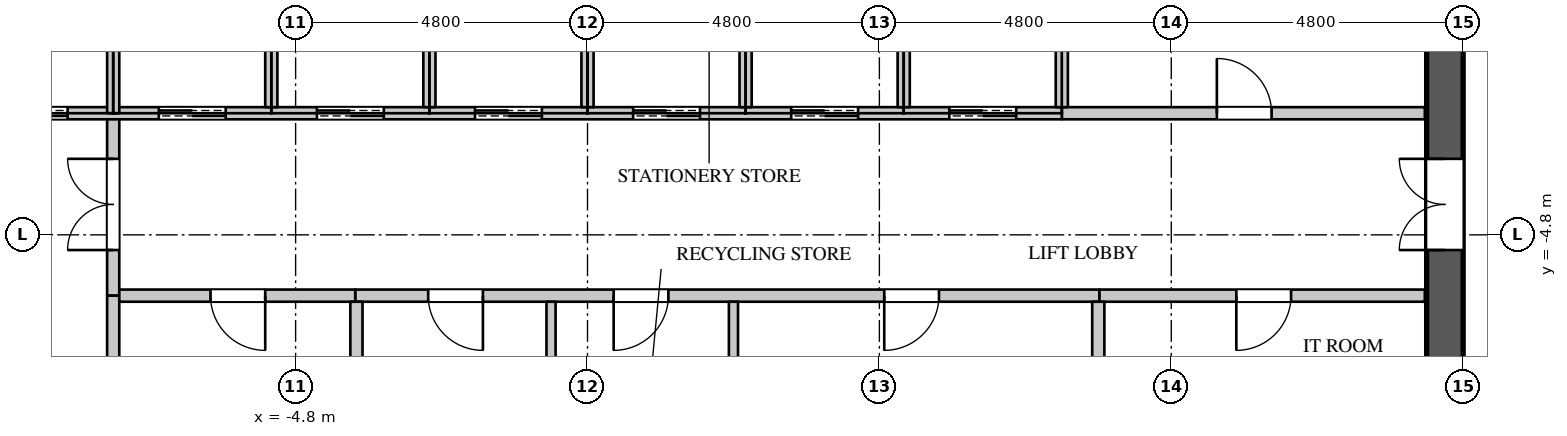
"""IFC4 building model, lengths in metres.
Left out: names, types, materials, properties, quantities, classifications, styles, units other than length and angle.
Written with IfcOpenShell. Run it as: python <this file> out.ifc"""

import sys

from ifc_helpers import new_model, si_unit, direction, frame, frame_2d, origin, place, context, subcontext, project, spatial, rectangle, extrude, element, fill, save


model = new_model("IFC4")
c1 = context("Model", 3, precision=1e-05, world=origin(), true_north=direction((0.0, 1.0)))
c2 = subcontext(c1, "Body", "Model", "MODEL_VIEW")
j1 = project(units=[si_unit("LENGTHUNIT", "METRE"), si_unit("PLANEANGLEUNIT", "RADIAN")], contexts=[c1])
p1 = place(None, origin())
s1 = spatial("IfcSite", under=j1, at=p1, CompositionType="ELEMENT")
p2 = place(p1, origin())
s2 = spatial("IfcBuilding", under=s1, at=p2, CompositionType="ELEMENT")
p3 = place(p2, frame((0.0, 0.0, 306.3)))
s3 = spatial("IfcBuildingStorey", under=s2, at=p3, CompositionType="ELEMENT", Elevation=306.3)
p4 = place(p3, frame((14.1, -11.4, 0.0), z_axis=(0.0, 0.0, 1.0), x_axis=(0.0, 1.0, 0.0)))
e1 = element("IfcWall", 1, at=p4, inside=s3, PredefinedType="SHEAR", context=c2, shape_type="SweptSolid", body=[
    extrude(rectangle(XDim=22.8, YDim=0.6, at=frame_2d((11.4, 0.0))), origin(), (0.0, 0.0, 1.0), 4.2),
])
p5 = place(p4, frame((20.45, 0.0, 0.0)))
e2 = element("IfcOpeningElement", 2, at=p5, cuts=e1, PredefinedType="OPENING", context=c2, shape_type="SweptSolid", body=[
    extrude(rectangle(XDim=1.1, YDim=2.2, at=frame_2d((0.55, 1.1))), frame((0.0, 0.31, 0.0), z_axis=(0.0, -1.0, 0.0), x_axis=(1.0, 0.0, 0.0)), (0.0, 0.0, 1.0), 0.62),
])
p6 = place(p4, frame((1.25, 0.0, 0.0)))
e3 = element("IfcOpeningElement", 3, at=p6, cuts=e1, PredefinedType="OPENING", context=c2, shape_type="SweptSolid", body=[
    extrude(rectangle(XDim=1.1, YDim=2.2, at=frame_2d((0.55, 1.1))), frame((0.0, 0.31, 0.0), z_axis=(0.0, -1.0, 0.0), x_axis=(1.0, 0.0, 0.0)), (0.0, 0.0, 1.0), 0.62),
])
p7 = place(p4, frame((14.95, 0.0, 0.0)))
e4 = element("IfcOpeningElement", 4, at=p7, cuts=e1, PredefinedType="OPENING", context=c2, shape_type="SweptSolid", body=[
    extrude(rectangle(XDim=1.5, YDim=2.4, at=frame_2d((0.75, 1.2))), frame((0.0, 0.31, 0.0), z_axis=(0.0, -1.0, 0.0), x_axis=(1.0, 0.0, 0.0)), (0.0, 0.0, 1.0), 0.62),
])
p8 = place(p4, frame((6.35, 0.0, 0.0)))
e5 = element("IfcOpeningElement", 5, at=p8, cuts=e1, PredefinedType="OPENING", context=c2, shape_type="SweptSolid", body=[
    extrude(rectangle(XDim=1.5, YDim=2.4, at=frame_2d((0.75, 1.2))), frame((0.0, 0.31, 0.0), z_axis=(0.0, -1.0, 0.0), x_axis=(1.0, 0.0, 0.0)), (0.0, 0.0, 1.0), 0.62),
])
p9 = place(p3, frame((-7.8, -5.8, 0.0), z_axis=(0.0, 0.0, 1.0), x_axis=(0.0, 1.0, 0.0)))
e6 = element("IfcWall", 6, at=p9, inside=s3, PredefinedType="PARTITIONING", context=c2, shape_type="SweptSolid", body=[
    extrude(rectangle(XDim=3.0, YDim=0.2, at=frame_2d((1.5, 0.0))), origin(), (0.0, 0.0, 1.0), 3.9),
])
p10 = place(p9, frame((0.75, 0.0, 0.0)))
e7 = element("IfcOpeningElement", 7, at=p10, cuts=e6, PredefinedType="OPENING", context=c2, shape_type="SweptSolid", body=[
    extrude(rectangle(XDim=1.5, YDim=2.4, at=frame_2d((0.75, 1.2))), frame((0.0, 0.11, 0.0), z_axis=(0.0, -1.0, 0.0), x_axis=(1.0, 0.0, 0.0)), (0.0, 0.0, 1.0), 0.22),
])
p11 = place(p3, frame((-3.82, -5.8, 0.0), z_axis=(0.0, 0.0, 1.0), x_axis=(1.0, 0.0, 0.0)))
e8 = element("IfcWall", 8, at=p11, inside=s3, PredefinedType="PARTITIONING", context=c2, shape_type="SweptSolid", body=[
    extrude(rectangle(XDim=12.24, YDim=0.2, at=frame_2d((6.12, 0.0))), origin(), (0.0, 0.0, 1.0), 3.9),
])
p12 = place(p11, frame((1.2, 0.0, 0.0)))
e9 = element("IfcOpeningElement", 9, at=p12, cuts=e8, PredefinedType="OPENING", context=c2, shape_type="SweptSolid", body=[
    extrude(rectangle(XDim=0.9, YDim=2.2, at=frame_2d((0.45, 1.1))), frame((0.0, 0.11, 0.0), z_axis=(0.0, -1.0, 0.0), x_axis=(1.0, 0.0, 0.0)), (0.0, 0.0, 1.0), 0.22),
])
p13 = place(p11, frame((4.25, 0.0, 0.0)))
e10 = element("IfcOpeningElement", 10, at=p13, cuts=e8, PredefinedType="OPENING", context=c2, shape_type="SweptSolid", body=[
    extrude(rectangle(XDim=0.9, YDim=2.2, at=frame_2d((0.45, 1.1))), frame((0.0, 0.11, 0.0), z_axis=(0.0, -1.0, 0.0), x_axis=(1.0, 0.0, 0.0)), (0.0, 0.0, 1.0), 0.22),
])
p14 = place(p11, frame((8.7, 0.0, 0.0)))
e11 = element("IfcOpeningElement", 11, at=p14, cuts=e8, PredefinedType="OPENING", context=c2, shape_type="SweptSolid", body=[
    extrude(rectangle(XDim=0.9, YDim=2.2, at=frame_2d((0.45, 1.1))), frame((0.0, 0.11, 0.0), z_axis=(0.0, -1.0, 0.0), x_axis=(1.0, 0.0, 0.0)), (0.0, 0.0, 1.0), 0.22),
])
for number, where, z_axis, x_axis in (
    (12, (-0.6, -11.37, 0.0), (0.0, 0.0, 1.0), (0.0, 1.0, 0.0)),
    (13, (2.4, -11.37, 0.0), (0.0, 0.0, 1.0), (0.0, 1.0, 0.0)),
):
    element("IfcWall", number, at=place(p3, frame(where, z_axis=z_axis, x_axis=x_axis)), inside=s3, PredefinedType="PARTITIONING", context=c2, shape_type="SweptSolid", body=[
        extrude(rectangle(XDim=5.47, YDim=0.15, at=frame_2d((2.735, 0.0))), origin(), (0.0, 0.0, 1.0), 3.9),
    ])
p15 = place(p3, frame((-7.8, -8.075, 0.0), z_axis=(0.0, 0.0, 1.0), x_axis=(0.0, 1.0, 0.0)))
e14 = element("IfcWall", 14, at=p15, inside=s3, PredefinedType="PARTITIONING", context=c2, shape_type="SweptSolid", body=[
    extrude(rectangle(XDim=2.275, YDim=0.2, at=frame_2d((1.137, 0.0))), origin(), (0.0, 0.0, 1.0), 3.9),
])
p16 = place(p3, frame((-7.7, -5.8, 0.0), z_axis=(0.0, 0.0, 1.0), x_axis=(1.0, 0.0, 0.0)))
e15 = element("IfcWall", 15, at=p16, inside=s3, PredefinedType="PARTITIONING", context=c2, shape_type="SweptSolid", body=[
    extrude(rectangle(XDim=3.88, YDim=0.2, at=frame_2d((1.94, 0.0))), origin(), (0.0, 0.0, 1.0), 3.9),
])
p17 = place(p16, frame((1.5, 0.0, 0.0)))
e16 = element("IfcOpeningElement", 16, at=p17, cuts=e15, PredefinedType="OPENING", context=c2, shape_type="SweptSolid", body=[
    extrude(rectangle(XDim=0.9, YDim=2.2, at=frame_2d((0.45, 1.1))), frame((0.0, 0.11, 0.0), z_axis=(0.0, -1.0, 0.0), x_axis=(1.0, 0.0, 0.0)), (0.0, 0.0, 1.0), 0.22),
])
p18 = place(p3, frame((-3.8, -11.37, 0.0), z_axis=(0.0, 0.0, 1.0), x_axis=(0.0, 1.0, 0.0)))
e17 = element("IfcWall", 17, at=p18, inside=s3, PredefinedType="PARTITIONING", context=c2, shape_type="SweptSolid", body=[
    extrude(rectangle(XDim=5.47, YDim=0.2, at=frame_2d((2.735, 0.0))), origin(), (0.0, 0.0, 1.0), 3.9),
])
p19 = place(p3, frame((7.8, -2.8, 0.0), z_axis=(0.0, 0.0, 1.0), x_axis=(1.0, 0.0, 0.0)))
e18 = element("IfcWall", 18, at=p19, inside=s3, PredefinedType="PARTITIONING", context=c2, shape_type="SweptSolid", body=[
    extrude(rectangle(XDim=5.97, YDim=0.2, at=frame_2d((2.985, 0.0))), origin(), (0.0, 0.0, 1.0), 3.9),
])
p20 = place(p19, frame((2.55, 0.0, 0.0)))
e19 = element("IfcOpeningElement", 19, at=p20, cuts=e18, PredefinedType="OPENING", context=c2, shape_type="SweptSolid", body=[
    extrude(rectangle(XDim=0.9, YDim=2.2, at=frame_2d((0.45, 1.1))), frame((0.0, 0.11, 0.0), z_axis=(0.0, -1.0, 0.0), x_axis=(1.0, 0.0, 0.0)), (0.0, 0.0, 1.0), 0.22),
])
p21 = place(p3, frame((8.42, -5.8, 0.0), z_axis=(0.0, 0.0, 1.0), x_axis=(1.0, 0.0, 0.0)))
e20 = element("IfcWall", 20, at=p21, inside=s3, PredefinedType="PARTITIONING", context=c2, shape_type="SweptSolid", body=[
    extrude(rectangle(XDim=5.35, YDim=0.2, at=frame_2d((2.675, 0.0))), origin(), (0.0, 0.0, 1.0), 3.9),
])
p22 = place(p21, frame((2.25, 0.0, 0.0)))
e21 = element("IfcOpeningElement", 21, at=p22, cuts=e20, PredefinedType="OPENING", context=c2, shape_type="SweptSolid", body=[
    extrude(rectangle(XDim=0.9, YDim=2.2, at=frame_2d((0.45, 1.1))), frame((0.0, 0.11, 0.0), z_axis=(0.0, -1.0, 0.0), x_axis=(1.0, 0.0, 0.0)), (0.0, 0.0, 1.0), 0.22),
])
p23 = place(p3, frame((8.4, -8.075, 0.0), z_axis=(0.0, 0.0, 1.0), x_axis=(0.0, 1.0, 0.0)))
e22 = element("IfcWall", 22, at=p23, inside=s3, PredefinedType="PARTITIONING", context=c2, shape_type="SweptSolid", body=[
    extrude(rectangle(XDim=2.175, YDim=0.2, at=frame_2d((1.087, 0.0))), origin(), (0.0, 0.0, 1.0), 3.9),
])
p24 = place(p3, frame((-10.4, -2.8, 0.0), z_axis=(0.0, 0.0, 1.0), x_axis=(1.0, 0.0, 0.0)))
e23 = element("IfcWall", 23, at=p24, inside=s3, PredefinedType="PARTITIONING", context=c2, shape_type="SweptSolid", body=[
    extrude(rectangle(XDim=18.2, YDim=0.2, at=frame_2d((9.1, 0.0))), origin(), (0.0, 0.0, 1.0), 3.9),
])
p25 = place(p24, frame((0.75, 0.0, 0.0)))
e24 = element("IfcOpeningElement", 24, at=p25, cuts=e23, PredefinedType="OPENING", context=c2, shape_type="SweptSolid", body=[
    extrude(rectangle(XDim=1.1, YDim=2.2, at=frame_2d((0.55, 1.1))), frame((0.0, 0.11, 0.0), z_axis=(0.0, -1.0, 0.0), x_axis=(1.0, 0.0, 0.0)), (0.0, 0.0, 1.0), 0.22),
])
p26 = place(p24, frame((3.35, 0.0, 0.0)))
e25 = element("IfcOpeningElement", 25, at=p26, cuts=e23, PredefinedType="OPENING", context=c2, shape_type="SweptSolid", body=[
    extrude(rectangle(XDim=1.1, YDim=2.2, at=frame_2d((0.55, 1.1))), frame((0.0, 0.11, 0.0), z_axis=(0.0, -1.0, 0.0), x_axis=(1.0, 0.0, 0.0)), (0.0, 0.0, 1.0), 0.22),
])
p27 = place(p24, frame((5.95, 0.0, 0.0)))
e26 = element("IfcOpeningElement", 26, at=p27, cuts=e23, PredefinedType="OPENING", context=c2, shape_type="SweptSolid", body=[
    extrude(rectangle(XDim=1.1, YDim=2.2, at=frame_2d((0.55, 1.1))), frame((0.0, 0.11, 0.0), z_axis=(0.0, -1.0, 0.0), x_axis=(1.0, 0.0, 0.0)), (0.0, 0.0, 1.0), 0.22),
])
p28 = place(p24, frame((8.55, 0.0, 0.0)))
e27 = element("IfcOpeningElement", 27, at=p28, cuts=e23, PredefinedType="OPENING", context=c2, shape_type="SweptSolid", body=[
    extrude(rectangle(XDim=1.1, YDim=2.2, at=frame_2d((0.55, 1.1))), frame((0.0, 0.11, 0.0), z_axis=(0.0, -1.0, 0.0), x_axis=(1.0, 0.0, 0.0)), (0.0, 0.0, 1.0), 0.22),
])
p29 = place(p24, frame((11.15, 0.0, 0.0)))
e28 = element("IfcOpeningElement", 28, at=p29, cuts=e23, PredefinedType="OPENING", context=c2, shape_type="SweptSolid", body=[
    extrude(rectangle(XDim=1.1, YDim=2.2, at=frame_2d((0.55, 1.1))), frame((0.0, 0.11, 0.0), z_axis=(0.0, -1.0, 0.0), x_axis=(1.0, 0.0, 0.0)), (0.0, 0.0, 1.0), 0.22),
])
p30 = place(p24, frame((13.75, 0.0, 0.0)))
e29 = element("IfcOpeningElement", 29, at=p30, cuts=e23, PredefinedType="OPENING", context=c2, shape_type="SweptSolid", body=[
    extrude(rectangle(XDim=1.1, YDim=2.2, at=frame_2d((0.55, 1.1))), frame((0.0, 0.11, 0.0), z_axis=(0.0, -1.0, 0.0), x_axis=(1.0, 0.0, 0.0)), (0.0, 0.0, 1.0), 0.22),
])
p31 = place(p24, frame((16.35, 0.0, 0.0)))
e30 = element("IfcOpeningElement", 30, at=p31, cuts=e23, PredefinedType="OPENING", context=c2, shape_type="SweptSolid", body=[
    extrude(rectangle(XDim=1.1, YDim=2.2, at=frame_2d((0.55, 1.1))), frame((0.0, 0.11, 0.0), z_axis=(0.0, -1.0, 0.0), x_axis=(1.0, 0.0, 0.0)), (0.0, 0.0, 1.0), 0.22),
])
p32 = place(p3, frame((-7.8, -2.8, 0.0), z_axis=(0.0, 0.0, 1.0), x_axis=(0.0, 1.0, 0.0)))
e31 = element("IfcWall", 31, at=p32, inside=s3, PredefinedType="PARTITIONING", context=c2, shape_type="SweptSolid", body=[
    extrude(rectangle(XDim=2.8, YDim=0.2, at=frame_2d((1.4, 0.0))), origin(), (0.0, 0.0, 1.0), 3.9),
])
for number, where, z_axis, x_axis in (
    (32, (-5.2, -2.7, 0.0), (0.0, 0.0, 1.0), (0.0, 1.0, 0.0)),
    (33, (-2.6, -2.7, 0.0), (0.0, 0.0, 1.0), (0.0, 1.0, 0.0)),
    (34, (0.0, -2.7, 0.0), (0.0, 0.0, 1.0), (0.0, 1.0, 0.0)),
    (35, (2.6, -2.7, 0.0), (0.0, 0.0, 1.0), (0.0, 1.0, 0.0)),
    (36, (5.2, -2.7, 0.0), (0.0, 0.0, 1.0), (0.0, 1.0, 0.0)),
    (37, (7.8, -2.7, 0.0), (0.0, 0.0, 1.0), (0.0, 1.0, 0.0)),
):
    element("IfcWall", number, at=place(p3, frame(where, z_axis=z_axis, x_axis=x_axis)), inside=s3, PredefinedType="PARTITIONING", context=c2, shape_type="SweptSolid", body=[
        extrude(rectangle(XDim=2.6, YDim=0.2, at=frame_2d((1.3, 0.0))), origin(), (0.0, 0.0, 1.0), 3.9),
    ])
p33 = place(p20, origin())
e38 = element("IfcDoor", 38, at=p33, inside=s3, OperationType="SINGLE_SWING_LEFT", PredefinedType="DOOR", context=c2, shape_type="SweptSolid", body=[
    extrude(rectangle(XDim=0.9, YDim=2.2, at=frame_2d((0.45, 1.1))), frame((0.0, 0.025, 0.0), z_axis=(0.0, -1.0, 0.0), x_axis=(1.0, 0.0, 0.0)), (0.0, 0.0, 1.0), 0.05),
])
fill(e19, e38)
p34 = place(p17, origin())
e39 = element("IfcDoor", 39, at=p34, inside=s3, OperationType="SINGLE_SWING_LEFT", PredefinedType="DOOR", context=c2, shape_type="SweptSolid", body=[
    extrude(rectangle(XDim=0.9, YDim=2.2, at=frame_2d((0.45, 1.1))), frame((0.0, 0.025, 0.0), z_axis=(0.0, -1.0, 0.0), x_axis=(1.0, 0.0, 0.0)), (0.0, 0.0, 1.0), 0.05),
])
fill(e16, e39)
p35 = place(p12, origin())
e40 = element("IfcDoor", 40, at=p35, inside=s3, OperationType="SINGLE_SWING_LEFT", PredefinedType="DOOR", context=c2, shape_type="SweptSolid", body=[
    extrude(rectangle(XDim=0.9, YDim=2.2, at=frame_2d((0.45, 1.1))), frame((0.0, 0.025, 0.0), z_axis=(0.0, -1.0, 0.0), x_axis=(1.0, 0.0, 0.0)), (0.0, 0.0, 1.0), 0.05),
])
fill(e9, e40)
p36 = place(p13, origin())
e41 = element("IfcDoor", 41, at=p36, inside=s3, OperationType="SINGLE_SWING_RIGHT", PredefinedType="DOOR", context=c2, shape_type="SweptSolid", body=[
    extrude(rectangle(XDim=0.9, YDim=2.2, at=frame_2d((0.45, 1.1))), frame((0.0, 0.025, 0.0), z_axis=(0.0, -1.0, 0.0), x_axis=(1.0, 0.0, 0.0)), (0.0, 0.0, 1.0), 0.05),
])
fill(e10, e41)
p37 = place(p14, origin())
e42 = element("IfcDoor", 42, at=p37, inside=s3, OperationType="SINGLE_SWING_RIGHT", PredefinedType="DOOR", context=c2, shape_type="SweptSolid", body=[
    extrude(rectangle(XDim=0.9, YDim=2.2, at=frame_2d((0.45, 1.1))), frame((0.0, 0.025, 0.0), z_axis=(0.0, -1.0, 0.0), x_axis=(1.0, 0.0, 0.0)), (0.0, 0.0, 1.0), 0.05),
])
fill(e11, e42)
p38 = place(p22, origin())
e43 = element("IfcDoor", 43, at=p38, inside=s3, OperationType="SINGLE_SWING_RIGHT", PredefinedType="DOOR", context=c2, shape_type="SweptSolid", body=[
    extrude(rectangle(XDim=0.9, YDim=2.2, at=frame_2d((0.45, 1.1))), frame((0.0, 0.025, 0.0), z_axis=(0.0, -1.0, 0.0), x_axis=(1.0, 0.0, 0.0)), (0.0, 0.0, 1.0), 0.05),
])
fill(e21, e43)
p39 = place(p25, origin())
e44 = element("IfcDoor", 44, at=p39, inside=s3, OperationType="DOUBLE_DOOR_SLIDING", PredefinedType="DOOR", context=c2, shape_type="SweptSolid", body=[
    extrude(rectangle(XDim=1.1, YDim=2.2, at=frame_2d((0.55, 1.1))), frame((0.0, 0.025, 0.0), z_axis=(0.0, -1.0, 0.0), x_axis=(1.0, 0.0, 0.0)), (0.0, 0.0, 1.0), 0.05),
])
fill(e24, e44)
p40 = place(p26, origin())
e45 = element("IfcDoor", 45, at=p40, inside=s3, OperationType="DOUBLE_DOOR_SLIDING", PredefinedType="DOOR", context=c2, shape_type="SweptSolid", body=[
    extrude(rectangle(XDim=1.1, YDim=2.2, at=frame_2d((0.55, 1.1))), frame((0.0, 0.025, 0.0), z_axis=(0.0, -1.0, 0.0), x_axis=(1.0, 0.0, 0.0)), (0.0, 0.0, 1.0), 0.05),
])
fill(e25, e45)
p41 = place(p27, origin())
e46 = element("IfcDoor", 46, at=p41, inside=s3, OperationType="DOUBLE_DOOR_SLIDING", PredefinedType="DOOR", context=c2, shape_type="SweptSolid", body=[
    extrude(rectangle(XDim=1.1, YDim=2.2, at=frame_2d((0.55, 1.1))), frame((0.0, 0.025, 0.0), z_axis=(0.0, -1.0, 0.0), x_axis=(1.0, 0.0, 0.0)), (0.0, 0.0, 1.0), 0.05),
])
fill(e26, e46)
p42 = place(p28, origin())
e47 = element("IfcDoor", 47, at=p42, inside=s3, OperationType="DOUBLE_DOOR_SLIDING", PredefinedType="DOOR", context=c2, shape_type="SweptSolid", body=[
    extrude(rectangle(XDim=1.1, YDim=2.2, at=frame_2d((0.55, 1.1))), frame((0.0, 0.025, 0.0), z_axis=(0.0, -1.0, 0.0), x_axis=(1.0, 0.0, 0.0)), (0.0, 0.0, 1.0), 0.05),
])
fill(e27, e47)
p43 = place(p29, origin())
e48 = element("IfcDoor", 48, at=p43, inside=s3, OperationType="DOUBLE_DOOR_SLIDING", PredefinedType="DOOR", context=c2, shape_type="SweptSolid", body=[
    extrude(rectangle(XDim=1.1, YDim=2.2, at=frame_2d((0.55, 1.1))), frame((0.0, 0.025, 0.0), z_axis=(0.0, -1.0, 0.0), x_axis=(1.0, 0.0, 0.0)), (0.0, 0.0, 1.0), 0.05),
])
fill(e28, e48)
p44 = place(p30, origin())
e49 = element("IfcDoor", 49, at=p44, inside=s3, OperationType="DOUBLE_DOOR_SLIDING", PredefinedType="DOOR", context=c2, shape_type="SweptSolid", body=[
    extrude(rectangle(XDim=1.1, YDim=2.2, at=frame_2d((0.55, 1.1))), frame((0.0, 0.025, 0.0), z_axis=(0.0, -1.0, 0.0), x_axis=(1.0, 0.0, 0.0)), (0.0, 0.0, 1.0), 0.05),
])
fill(e29, e49)
p45 = place(p31, origin())
e50 = element("IfcDoor", 50, at=p45, inside=s3, OperationType="DOUBLE_DOOR_SLIDING", PredefinedType="DOOR", context=c2, shape_type="SweptSolid", body=[
    extrude(rectangle(XDim=1.1, YDim=2.2, at=frame_2d((0.55, 1.1))), frame((0.0, 0.025, 0.0), z_axis=(0.0, -1.0, 0.0), x_axis=(1.0, 0.0, 0.0)), (0.0, 0.0, 1.0), 0.05),
])
fill(e30, e50)
p46 = place(p10, origin())
e51 = element("IfcDoor", 51, at=p46, inside=s3, OperationType="DOUBLE_DOOR_SINGLE_SWING", PredefinedType="DOOR", context=c2, shape_type="SweptSolid", body=[
    extrude(rectangle(XDim=1.5, YDim=2.4, at=frame_2d((0.75, 1.2))), frame((0.0, 0.025, 0.0), z_axis=(0.0, -1.0, 0.0), x_axis=(1.0, 0.0, 0.0)), (0.0, 0.0, 1.0), 0.05),
])
fill(e7, e51)
p47 = place(p8, origin())
e52 = element("IfcDoor", 52, at=p47, inside=s3, OperationType="DOUBLE_DOOR_SINGLE_SWING", PredefinedType="DOOR", context=c2, shape_type="SweptSolid", body=[
    extrude(rectangle(XDim=1.5, YDim=2.4, at=frame_2d((0.75, 1.2))), frame((0.0, 0.295, 0.0), z_axis=(0.0, -1.0, 0.0), x_axis=(1.0, 0.0, 0.0)), (0.0, 0.0, 1.0), 0.05),
])
fill(e5, e52)
save(model, sys.argv[1])
